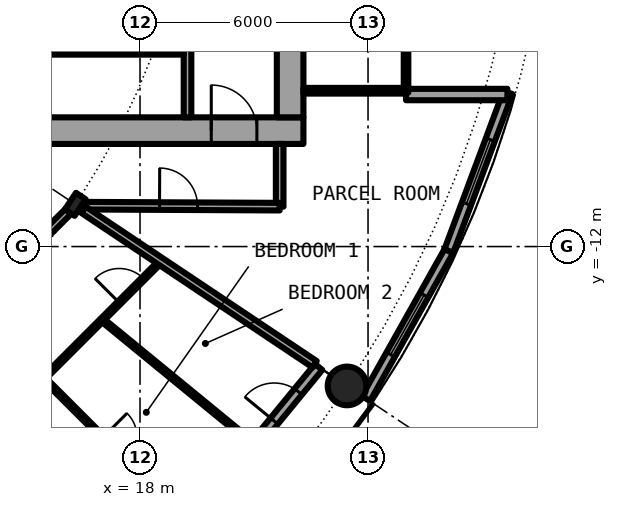
"""IFC4 building model, lengths in metres.
Left out: names, types, materials, properties, quantities, classifications, styles, units other than length and angle.
Written with IfcOpenShell. Run it as: python <this file> out.ifc"""

import sys

from ifc_helpers import new_model, si_unit, direction, frame, frame_2d, origin, origin_2d, place, context, subcontext, project, spatial, rectangle, hollow_circle, i_section, extrude, element, fill, save


model = new_model("IFC4")
c1 = context("Model", 3, precision=1e-05, world=origin(), true_north=direction((0.0, 1.0)))
c2 = subcontext(c1, "Body", "Model", "MODEL_VIEW")
j1 = project(units=[si_unit("LENGTHUNIT", "METRE"), si_unit("PLANEANGLEUNIT", "RADIAN")], contexts=[c1])
p1 = place(None, origin())
s1 = spatial("IfcSite", under=j1, at=p1, CompositionType="ELEMENT")
p2 = place(p1, origin())
s2 = spatial("IfcBuilding", under=s1, at=p2, CompositionType="ELEMENT")
p3 = place(p2, frame((0.0, 0.0, 91.05)))
s3 = spatial("IfcBuildingStorey", under=s2, at=p3, CompositionType="ELEMENT", Elevation=91.05)
p4 = place(p3, frame((23.448, -15.667, 0.0), z_axis=(0.0, 0.0, 1.0), x_axis=(1.0, 0.0, 0.0)))
e1 = element("IfcColumn", 1, at=p4, inside=s3, PredefinedType="COLUMN", context=c2, shape_type="SweptSolid", body=[
    extrude(hollow_circle(Radius=0.508, WallThickness=0.04, at=origin_2d()), origin(), (0.0, 0.0, 1.0), 3.05),
])
p5 = place(p3, frame((16.297, -10.889, 0.0), z_axis=(0.0, 0.0, 1.0), x_axis=(0.831469612303, -0.55557023302, 0.0)))
e2 = element("IfcColumn", 2, at=p5, inside=s3, PredefinedType="COLUMN", context=c2, shape_type="SweptSolid", body=[
    extrude(i_section(OverallWidth=0.306, OverallDepth=0.524, WebThickness=0.021, FlangeThickness=0.04, FilletRadius=0.027, at=origin_2d()), origin(), (0.0, 0.0, 1.0), 3.05),
])
p6 = place(p3, frame((19.304, -19.304, 0.0), z_axis=(0.0, 0.0, 1.0), x_axis=(0.634382322723, 0.773019449054, 0.0)))
e3 = element("IfcWall", 3, at=p6, inside=s3, PredefinedType="SOLIDWALL", context=c2, shape_type="SweptSolid", body=[
    extrude(rectangle(XDim=5.352, YDim=0.25, at=frame_2d((2.676, 0.0))), origin(), (0.0, 0.0, 1.0), 2.7),
])
p7 = place(p6, frame((0.441, 0.0, 0.3)))
e4 = element("IfcOpeningElement", 4, at=p7, cuts=e3, PredefinedType="OPENING", context=c2, shape_type="SweptSolid", body=[
    extrude(rectangle(XDim=1.8, YDim=2.1, at=frame_2d((0.9, 1.05))), frame((0.0, 0.135, 0.0), z_axis=(0.0, -1.0, 0.0), x_axis=(1.0, 0.0, 0.0)), (0.0, 0.0, 1.0), 0.27),
])
p8 = place(p6, frame((3.51, 0.0, 0.0)))
e5 = element("IfcOpeningElement", 5, at=p8, cuts=e3, PredefinedType="OPENING", context=c2, shape_type="SweptSolid", body=[
    extrude(rectangle(XDim=1.0, YDim=2.2, at=frame_2d((0.5, 1.1))), frame((0.0, 0.135, 0.0), z_axis=(0.0, -1.0, 0.0), x_axis=(1.0, 0.0, 0.0)), (0.0, 0.0, 1.0), 0.27),
])
p9 = place(p3, frame((23.946, -16.0, 0.0), z_axis=(0.0, 0.0, 1.0), x_axis=(0.489696356642, 0.871893042919, 0.0)))
e6 = element("IfcWall", 6, at=p9, inside=s3, PredefinedType="SOLIDWALL", context=c2, shape_type="SweptSolid", body=[
    extrude(rectangle(XDim=4.454, YDim=0.25, at=frame_2d((2.227, 0.0))), origin(), (0.0, 0.0, 1.0), 2.7),
])
p10 = place(p9, frame((1.327, 0.0, 0.3)))
e7 = element("IfcOpeningElement", 7, at=p10, cuts=e6, PredefinedType="OPENING", context=c2, shape_type="SweptSolid", body=[
    extrude(rectangle(XDim=1.8, YDim=2.1, at=frame_2d((0.9, 1.05))), frame((0.0, 0.135, 0.0), z_axis=(0.0, -1.0, 0.0), x_axis=(1.0, 0.0, 0.0)), (0.0, 0.0, 1.0), 0.27),
])
p11 = place(p3, frame((26.127, -12.117, 0.0), z_axis=(0.0, 0.0, 1.0), x_axis=(0.349247811493, 0.937030397675, 0.0)))
e8 = element("IfcWall", 8, at=p11, inside=s3, PredefinedType="SOLIDWALL", context=c2, shape_type="SweptSolid", body=[
    extrude(rectangle(XDim=4.452, YDim=0.25, at=frame_2d((2.226, 0.0))), origin(), (0.0, 0.0, 1.0), 2.7),
])
p12 = place(p11, frame((1.327, 0.0, 0.3)))
e9 = element("IfcOpeningElement", 9, at=p12, cuts=e8, PredefinedType="OPENING", context=c2, shape_type="SweptSolid", body=[
    extrude(rectangle(XDim=1.8, YDim=2.1, at=frame_2d((0.9, 1.05))), frame((0.0, 0.135, 0.0), z_axis=(0.0, -1.0, 0.0), x_axis=(1.0, 0.0, 0.0)), (0.0, 0.0, 1.0), 0.27),
])
p13 = place(p3, frame((25.0, -8.0, 0.0), z_axis=(0.0, 0.0, 1.0), x_axis=(1.0, 0.0, 0.0)))
e10 = element("IfcWall", 10, at=p13, inside=s3, PredefinedType="SOLIDWALL", context=c2, shape_type="SweptSolid", body=[
    extrude(rectangle(XDim=2.667, YDim=0.3, at=frame_2d((1.333, 0.0))), origin(), (0.0, 0.0, 1.0), 2.7),
])
p14 = place(p3, frame((8.3, -8.95, 0.0), z_axis=(0.0, 0.0, 1.0), x_axis=(1.0, 0.0, 0.0)))
e11 = element("IfcWall", 11, at=p14, inside=s3, PredefinedType="SHEAR", context=c2, shape_type="SweptSolid", body=[
    extrude(rectangle(XDim=14.0, YDim=0.7, at=frame_2d((7.0, 0.0))), origin(), (0.0, 0.0, 1.0), 3.05),
])
p15 = place(p14, frame((11.575, 0.0, 0.0)))
e12 = element("IfcOpeningElement", 12, at=p15, cuts=e11, PredefinedType="OPENING", context=c2, shape_type="SweptSolid", body=[
    extrude(rectangle(XDim=1.2, YDim=2.3, at=frame_2d((0.6, 1.15))), frame((0.0, 0.36, 0.0), z_axis=(0.0, -1.0, 0.0), x_axis=(1.0, 0.0, 0.0)), (0.0, 0.0, 1.0), 0.72),
])
p16 = place(p3, frame((21.95, 8.6, 0.0), z_axis=(0.0, 0.0, 1.0), x_axis=(0.0, -1.0, 0.0)))
e13 = element("IfcWall", 13, at=p16, inside=s3, PredefinedType="SHEAR", context=c2, shape_type="SweptSolid", body=[
    extrude(rectangle(XDim=17.2, YDim=0.7, at=frame_2d((8.6, 0.0))), origin(), (0.0, 0.0, 1.0), 3.05),
])
p17 = place(p16, frame((7.7, 0.0, 0.0)))
e14 = element("IfcOpeningElement", 14, at=p17, cuts=e13, PredefinedType="OPENING", context=c2, shape_type="SweptSolid", body=[
    extrude(rectangle(XDim=1.8, YDim=2.3, at=frame_2d((0.9, 1.15))), frame((0.0, 0.36, 0.0), z_axis=(0.0, -1.0, 0.0), x_axis=(1.0, 0.0, 0.0)), (0.0, 0.0, 1.0), 0.72),
])
p18 = place(p3, frame((19.25, -8.6, 0.0), z_axis=(0.0, 0.0, 1.0), x_axis=(0.0, 1.0, 0.0)))
e15 = element("IfcWall", 15, at=p18, inside=s3, PredefinedType="SOLIDWALL", context=c2, shape_type="SweptSolid", body=[
    extrude(rectangle(XDim=7.025, YDim=0.2, at=frame_2d((3.513, 0.0))), origin(), (0.0, 0.0, 1.0), 2.7),
])
p19 = place(p18, frame((2.35, 0.0, 0.0)))
e16 = element("IfcOpeningElement", 16, at=p19, cuts=e15, PredefinedType="OPENING", context=c2, shape_type="SweptSolid", body=[
    extrude(rectangle(XDim=1.1, YDim=2.3, at=frame_2d((0.55, 1.15))), frame((0.0, 0.11, 0.0), z_axis=(0.0, -1.0, 0.0), x_axis=(1.0, 0.0, 0.0)), (0.0, 0.0, 1.0), 0.22),
])
p20 = place(p3, frame((15.45, -6.875, 0.0), z_axis=(0.0, 0.0, 1.0), x_axis=(1.0, 0.0, 0.0)))
e17 = element("IfcWall", 17, at=p20, inside=s3, PredefinedType="PARTITIONING", context=c2, shape_type="SweptSolid", body=[
    extrude(rectangle(XDim=3.7, YDim=0.15, at=frame_2d((1.85, 0.0))), origin(), (0.0, 0.0, 1.0), 2.7),
])
p21 = place(p20, frame((1.4, 0.0, 0.0)))
e18 = element("IfcOpeningElement", 18, at=p21, cuts=e17, PredefinedType="OPENING", context=c2, shape_type="SweptSolid", body=[
    extrude(rectangle(XDim=0.9, YDim=2.3, at=frame_2d((0.45, 1.15))), frame((0.0, 0.085, 0.0), z_axis=(0.0, -1.0, 0.0), x_axis=(1.0, 0.0, 0.0)), (0.0, 0.0, 1.0), 0.17),
])
p22 = place(p3, frame((22.3, -7.9, 0.0), z_axis=(0.0, 0.0, 1.0), x_axis=(1.0, 0.0, 0.0)))
e19 = element("IfcWall", 19, at=p22, inside=s3, PredefinedType="PARTITIONING", context=c2, shape_type="SweptSolid", body=[
    extrude(rectangle(XDim=2.64, YDim=0.15, at=frame_2d((1.32, 0.0))), origin(), (0.0, 0.0, 1.0), 2.7),
])
p23 = place(p3, frame((25.0, -7.95, 0.0), z_axis=(0.0, 0.0, 1.0), x_axis=(0.0, 1.0, 0.0)))
e20 = element("IfcWall", 20, at=p23, inside=s3, PredefinedType="PARTITIONING", context=c2, shape_type="SweptSolid", body=[
    extrude(rectangle(XDim=15.9, YDim=0.12, at=frame_2d((7.95, 0.0))), origin(), (0.0, 0.0, 1.0), 2.7),
])
p24 = place(p23, frame((0.95, 0.0, 0.1)))
e21 = element("IfcOpeningElement", 21, at=p24, cuts=e20, PredefinedType="OPENING", context=c2, shape_type="SweptSolid", body=[
    extrude(rectangle(XDim=14.0, YDim=2.35, at=frame_2d((7.0, 1.175))), frame((0.0, 0.07, 0.0), z_axis=(0.0, -1.0, 0.0), x_axis=(1.0, 0.0, 0.0)), (0.0, 0.0, 1.0), 0.14),
])
p25 = place(p3, frame((15.468, -15.463, 0.0), z_axis=(0.0, 0.0, 1.0), x_axis=(0.707106781187, 0.707106781187, 0.0)))
e22 = element("IfcWall", 22, at=p25, inside=s3, PredefinedType="PARTITIONING", context=c2, shape_type="SweptSolid", body=[
    extrude(rectangle(XDim=4.351, YDim=0.1, at=frame_2d((2.176, 0.0))), origin(), (0.0, 0.0, 1.0), 2.7),
])
p26 = place(p25, frame((2.808, 0.0, 0.0)))
e23 = element("IfcOpeningElement", 23, at=p26, cuts=e22, PredefinedType="OPENING", context=c2, shape_type="SweptSolid", body=[
    extrude(rectangle(XDim=0.9, YDim=2.3, at=frame_2d((0.45, 1.15))), frame((0.0, 0.06, 0.0), z_axis=(0.0, -1.0, 0.0), x_axis=(1.0, 0.0, 0.0)), (0.0, 0.0, 1.0), 0.12),
])
p27 = place(p3, frame((21.675, -10.95, 0.0), z_axis=(0.0, 0.0, 1.0), x_axis=(0.0, 1.0, 0.0)))
e24 = element("IfcWall", 24, at=p27, inside=s3, PredefinedType="PARTITIONING", context=c2, shape_type="SweptSolid", body=[
    extrude(rectangle(XDim=1.65, YDim=0.2, at=frame_2d((0.825, 0.0))), origin(), (0.0, 0.0, 1.0), 2.7),
])
p28 = place(p3, frame((11.0, -16.186, 0.0), z_axis=(0.0, 0.0, 1.0), x_axis=(0.707106781187, 0.707106781187, 0.0)))
e25 = element("IfcWall", 25, at=p28, inside=s3, PredefinedType="PARTITIONING", context=c2, shape_type="SweptSolid", body=[
    extrude(rectangle(XDim=7.334, YDim=0.2, at=frame_2d((3.667, 0.0))), origin(), (0.0, 0.0, 1.0), 2.38),
])
p29 = place(p28, frame((4.123, 0.0, 0.0)))
e26 = element("IfcOpeningElement", 26, at=p29, cuts=e25, PredefinedType="OPENING", context=c2, shape_type="SweptSolid", body=[
    extrude(rectangle(XDim=1.0, YDim=2.3, at=frame_2d((0.5, 1.15))), frame((0.0, 0.11, 0.0), z_axis=(0.0, -1.0, 0.0), x_axis=(1.0, 0.0, 0.0)), (0.0, 0.0, 1.0), 0.22),
])
p30 = place(p3, frame((16.588, -10.925, 0.0), z_axis=(0.0, 0.0, 1.0), x_axis=(0.999988019025, -0.004895079807, 0.0)))
e27 = element("IfcWall", 27, at=p30, inside=s3, PredefinedType="PARTITIONING", context=c2, shape_type="SweptSolid", body=[
    extrude(rectangle(XDim=5.087, YDim=0.2, at=frame_2d((2.543, 0.0))), origin(), (0.0, 0.0, 1.0), 2.7),
])
p31 = place(p30, frame((1.925, 0.0, 0.0)))
e28 = element("IfcOpeningElement", 28, at=p31, cuts=e27, PredefinedType="OPENING", context=c2, shape_type="SweptSolid", body=[
    extrude(rectangle(XDim=1.0, YDim=2.3, at=frame_2d((0.5, 1.15))), frame((0.0, 0.11, 0.0), z_axis=(0.0, -1.0, 0.0), x_axis=(1.0, 0.0, 0.0)), (0.0, 0.0, 1.0), 0.22),
])
p32 = place(p3, frame((15.465, -15.465, 0.0), z_axis=(0.0, 0.0, 1.0), x_axis=(0.707106781187, -0.707106781187, 0.0)))
e29 = element("IfcWall", 29, at=p32, inside=s3, PredefinedType="PARTITIONING", context=c2, shape_type="SweptSolid", body=[
    extrude(rectangle(XDim=5.305, YDim=0.1, at=frame_2d((2.652, 0.0))), origin(), (0.0, 0.0, 1.0), 2.7),
])
p33 = place(p32, frame((2.202, 0.0, 0.0)))
e30 = element("IfcOpeningElement", 30, at=p33, cuts=e29, PredefinedType="OPENING", context=c2, shape_type="SweptSolid", body=[
    extrude(rectangle(XDim=0.9, YDim=2.3, at=frame_2d((0.45, 1.15))), frame((0.0, 0.06, 0.0), z_axis=(0.0, -1.0, 0.0), x_axis=(1.0, 0.0, 0.0)), (0.0, 0.0, 1.0), 0.12),
])
p34 = place(p3, frame((16.515, -11.035, 0.0), z_axis=(0.0, 0.0, 1.0), x_axis=(0.831505405283, -0.555516661303, 0.0)))
e31 = element("IfcWall", 31, at=p34, inside=s3, PredefinedType="PARTITIONING", context=c2, shape_type="SweptSolid", body=[
    extrude(rectangle(XDim=7.312, YDim=0.2, at=frame_2d((3.656, 0.0))), origin(), (0.0, 0.0, 1.0), 2.7),
])
p35 = place(p3, frame((17.004, -13.927, 0.0), z_axis=(0.0, 0.0, 1.0), x_axis=(0.773517471898, -0.633774976367, 0.0)))
e32 = element("IfcWall", 32, at=p35, inside=s3, PredefinedType="PARTITIONING", context=c2, shape_type="SweptSolid", body=[
    extrude(rectangle(XDim=5.196, YDim=0.1, at=frame_2d((2.598, 0.0))), origin(), (0.0, 0.0, 1.0), 2.7),
])
p36 = place(p8, origin())
e33 = element("IfcDoor", 33, at=p36, inside=s3, OperationType="SINGLE_SWING_LEFT", PredefinedType="DOOR", context=c2, shape_type="SweptSolid", body=[
    extrude(rectangle(XDim=1.0, YDim=2.2, at=frame_2d((0.5, 1.1))), frame((0.0, 0.025, 0.0), z_axis=(0.0, -1.0, 0.0), x_axis=(1.0, 0.0, 0.0)), (0.0, 0.0, 1.0), 0.05),
])
fill(e5, e33)
p37 = place(p10, origin())
e34 = element("IfcWindow", 34, at=p37, inside=s3, PartitioningType="SINGLE_PANEL", PredefinedType="WINDOW", context=c2, shape_type="SweptSolid", body=[
    extrude(rectangle(XDim=1.8, YDim=2.1, at=frame_2d((0.9, 1.05))), frame((0.0, 0.03, 0.0), z_axis=(0.0, -1.0, 0.0), x_axis=(1.0, 0.0, 0.0)), (0.0, 0.0, 1.0), 0.06),
])
fill(e7, e34)
p38 = place(p12, origin())
e35 = element("IfcWindow", 35, at=p38, inside=s3, PartitioningType="SINGLE_PANEL", PredefinedType="WINDOW", context=c2, shape_type="SweptSolid", body=[
    extrude(rectangle(XDim=1.8, YDim=2.1, at=frame_2d((0.9, 1.05))), frame((0.0, 0.03, 0.0), z_axis=(0.0, -1.0, 0.0), x_axis=(1.0, 0.0, 0.0)), (0.0, 0.0, 1.0), 0.06),
])
fill(e9, e35)
p39 = place(p21, origin())
e36 = element("IfcDoor", 36, at=p39, inside=s3, OperationType="SINGLE_SWING_LEFT", PredefinedType="DOOR", context=c2, shape_type="SweptSolid", body=[
    extrude(rectangle(XDim=0.9, YDim=2.3, at=frame_2d((0.45, 1.15))), frame((0.0, 0.025, 0.0), z_axis=(0.0, -1.0, 0.0), x_axis=(1.0, 0.0, 0.0)), (0.0, 0.0, 1.0), 0.05),
])
fill(e18, e36)
p40 = place(p15, origin())
e37 = element("IfcDoor", 37, at=p40, inside=s3, OperationType="SINGLE_SWING_LEFT", PredefinedType="DOOR", context=c2, shape_type="SweptSolid", body=[
    extrude(rectangle(XDim=1.2, YDim=2.3, at=frame_2d((0.6, 1.15))), frame((0.0, 0.025, 0.0), z_axis=(0.0, -1.0, 0.0), x_axis=(1.0, 0.0, 0.0)), (0.0, 0.0, 1.0), 0.05),
])
fill(e12, e37)
p41 = place(p24, origin())
e38 = element("IfcWindow", 38, at=p41, inside=s3, PartitioningType="SINGLE_PANEL", PredefinedType="WINDOW", context=c2, shape_type="SweptSolid", body=[
    extrude(rectangle(XDim=14.0, YDim=2.35, at=frame_2d((7.0, 1.175))), frame((0.0, 0.03, 0.0), z_axis=(0.0, -1.0, 0.0), x_axis=(1.0, 0.0, 0.0)), (0.0, 0.0, 1.0), 0.06),
])
fill(e21, e38)
p42 = place(p26, origin())
e39 = element("IfcDoor", 39, at=p42, inside=s3, OperationType="SINGLE_SWING_RIGHT", PredefinedType="DOOR", context=c2, shape_type="SweptSolid", body=[
    extrude(rectangle(XDim=0.9, YDim=2.3, at=frame_2d((0.45, 1.15))), frame((0.0, 0.025, 0.0), z_axis=(0.0, -1.0, 0.0), x_axis=(1.0, 0.0, 0.0)), (0.0, 0.0, 1.0), 0.05),
])
fill(e23, e39)
p43 = place(p31, origin())
e40 = element("IfcDoor", 40, at=p43, inside=s3, OperationType="SINGLE_SWING_LEFT", PredefinedType="DOOR", context=c2, shape_type="SweptSolid", body=[
    extrude(rectangle(XDim=1.0, YDim=2.3, at=frame_2d((0.5, 1.15))), frame((0.0, 0.025, 0.0), z_axis=(0.0, -1.0, 0.0), x_axis=(1.0, 0.0, 0.0)), (0.0, 0.0, 1.0), 0.05),
])
fill(e28, e40)
save(model, sys.argv[1])
